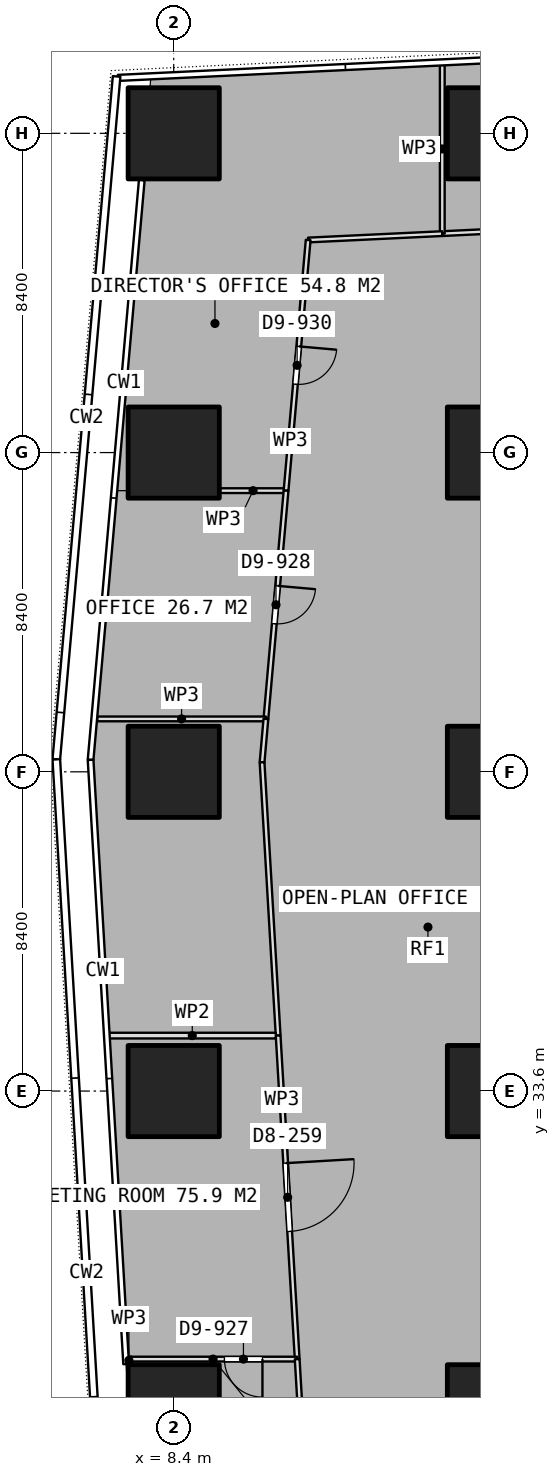
"""IFC4 building model, lengths in metres.
Left out: names, types, materials, properties, quantities, classifications, styles, units other than length and angle.
Written with IfcOpenShell. Run it as: python <this file> out.ifc"""

import sys

from ifc_helpers import new_model, si_unit, direction, frame, frame_2d, origin, origin_2d, place, context, subcontext, project, spatial, rectangle, extrude, element, fill, save


model = new_model("IFC4")
c1 = context("Model", 3, precision=1e-05, world=origin(), true_north=direction((0.0, 1.0)))
c2 = subcontext(c1, "Body", "Model", "MODEL_VIEW")
j1 = project(units=[si_unit("LENGTHUNIT", "METRE"), si_unit("PLANEANGLEUNIT", "RADIAN")], contexts=[c1])
p1 = place(None, origin())
s1 = spatial("IfcSite", under=j1, at=p1, CompositionType="ELEMENT")
p2 = place(p1, origin())
s2 = spatial("IfcBuilding", under=s1, at=p2, CompositionType="ELEMENT")
p3 = place(p2, frame((0.0, 0.0, 236.45)))
s3 = spatial("IfcBuildingStorey", under=s2, at=p3, CompositionType="ELEMENT", Elevation=236.45)
for number, where, z_axis, x_axis in (
    (1, (8.4, 25.2, 0.0), (0.0, 0.0, 1.0), (1.0, 0.0, 0.0)),
    (2, (8.4, 33.6, 0.0), (0.0, 0.0, 1.0), (1.0, 0.0, 0.0)),
    (3, (8.4, 42.0, 0.0), (0.0, 0.0, 1.0), (1.0, 0.0, 0.0)),
    (4, (8.4, 50.4, 0.0), (0.0, 0.0, 1.0), (1.0, 0.0, 0.0)),
    (5, (8.4, 58.8, 0.0), (0.0, 0.0, 1.0), (1.0, 0.0, 0.0)),
    (6, (16.8, 25.2, 0.0), (0.0, 0.0, 1.0), (1.0, 0.0, 0.0)),
    (7, (16.8, 33.6, 0.0), (0.0, 0.0, 1.0), (1.0, 0.0, 0.0)),
    (8, (16.8, 42.0, 0.0), (0.0, 0.0, 1.0), (1.0, 0.0, 0.0)),
    (9, (16.8, 50.4, 0.0), (0.0, 0.0, 1.0), (1.0, 0.0, 0.0)),
    (10, (16.8, 58.8, 0.0), (0.0, 0.0, 1.0), (1.0, 0.0, 0.0)),
):
    element("IfcColumn", number, at=place(p3, frame(where, z_axis=z_axis, x_axis=x_axis)), inside=s3, PredefinedType="COLUMN", context=c2, shape_type="SweptSolid", body=[
        extrude(rectangle(XDim=2.4, YDim=2.4, at=origin_2d()), origin(), (0.0, 0.0, 1.0), 3.75),
    ])
p4 = place(p3, frame((23.792, 56.559, 0.0), z_axis=(0.0, 0.0, 1.0), x_axis=(-0.998858041753, -0.047776693337, 0.0)))
e11 = element("IfcWall", 11, at=p4, inside=s3, PredefinedType="PARTITIONING", context=c2, shape_type="SweptSolid", body=[
    extrude(rectangle(XDim=8.334, YDim=0.125, at=frame_2d((4.167, 0.0))), origin(), (0.0, 0.0, 1.0), 3.4),
])
p5 = place(p3, frame((15.467, 56.161, 0.0), z_axis=(0.0, 0.0, 1.0), x_axis=(0.0, 1.0, 0.0)))
e12 = element("IfcWall", 12, at=p5, inside=s3, PredefinedType="PARTITIONING", context=c2, shape_type="SweptSolid", body=[
    extrude(rectangle(XDim=4.456, YDim=0.125, at=frame_2d((2.228, 0.0))), origin(), (0.0, 0.0, 1.0), 3.4),
])
p6 = place(p3, frame((11.356, 49.398, 0.0), z_axis=(0.0, 0.0, 1.0), x_axis=(-1.0, 0.0, 0.0)))
e13 = element("IfcWall", 13, at=p6, inside=s3, PredefinedType="PARTITIONING", context=c2, shape_type="SweptSolid", body=[
    extrude(rectangle(XDim=1.736, YDim=0.125, at=frame_2d((0.868, 0.0))), origin(), (0.0, 0.0, 1.0), 3.4),
])
p7 = place(p3, frame((15.466, 56.161, 0.0), z_axis=(0.0, 0.0, 1.0), x_axis=(-0.998868606823, -0.047555297315, 0.0)))
e14 = element("IfcWall", 14, at=p7, inside=s3, PredefinedType="PARTITIONING", context=c2, shape_type="SweptSolid", body=[
    extrude(rectangle(XDim=3.532, YDim=0.125, at=frame_2d((1.766, 0.0))), origin(), (0.0, 0.0, 1.0), 3.4),
])
p8 = place(p3, frame((11.938, 55.993, 0.0), z_axis=(0.0, 0.0, 1.0), x_axis=(-0.087912105784, -0.996128235548, 0.0)))
e15 = element("IfcWall", 15, at=p8, inside=s3, PredefinedType="PARTITIONING", context=c2, shape_type="SweptSolid", body=[
    extrude(rectangle(XDim=6.621, YDim=0.125, at=frame_2d((3.31, 0.0))), origin(), (0.0, 0.0, 1.0), 3.4),
])
p9 = place(p8, frame((2.81, 0.0, 0.0)))
e16 = element("IfcOpeningElement", 16, at=p9, cuts=e15, PredefinedType="OPENING", context=c2, shape_type="SweptSolid", body=[
    extrude(rectangle(XDim=1.0, YDim=2.1, at=frame_2d((0.5, 1.05))), frame((0.0, 0.073, 0.0), z_axis=(0.0, -1.0, 0.0), x_axis=(1.0, 0.0, 0.0)), (0.0, 0.0, 1.0), 0.145),
])
p10 = place(p3, frame((11.356, 49.397, 0.0), z_axis=(0.0, 0.0, 1.0), x_axis=(-0.08792454125, -0.996127137993, 0.0)))
e17 = element("IfcWall", 17, at=p10, inside=s3, PredefinedType="PARTITIONING", context=c2, shape_type="SweptSolid", body=[
    extrude(rectangle(XDim=6.028, YDim=0.125, at=frame_2d((3.014, 0.0))), origin(), (0.0, 0.0, 1.0), 3.4),
])
p11 = place(p10, frame((2.514, 0.0, 0.0)))
e18 = element("IfcOpeningElement", 18, at=p11, cuts=e17, PredefinedType="OPENING", context=c2, shape_type="SweptSolid", body=[
    extrude(rectangle(XDim=1.0, YDim=2.1, at=frame_2d((0.5, 1.05))), frame((0.0, 0.073, 0.0), z_axis=(0.0, -1.0, 0.0), x_axis=(1.0, 0.0, 0.0)), (0.0, 0.0, 1.0), 0.145),
])
p12 = place(p3, frame((10.826, 43.392, 0.0), z_axis=(0.0, 0.0, 1.0), x_axis=(-1.0, 0.0, 0.0)))
e19 = element("IfcWall", 19, at=p12, inside=s3, PredefinedType="PARTITIONING", context=c2, shape_type="SweptSolid", body=[
    extrude(rectangle(XDim=4.438, YDim=0.125, at=frame_2d((2.219, 0.0))), origin(), (0.0, 0.0, 1.0), 3.4),
])
p13 = place(p3, frame((10.826, 43.391, 0.0), z_axis=(0.0, 0.0, 1.0), x_axis=(-0.087943526258, -0.996125462073, 0.0)))
e20 = element("IfcWall", 20, at=p13, inside=s3, PredefinedType="PARTITIONING", context=c2, shape_type="SweptSolid", body=[
    extrude(rectangle(XDim=1.146, YDim=0.125, at=frame_2d((0.573, 0.0))), origin(), (0.0, 0.0, 1.0), 3.4),
])
p14 = place(p3, frame((10.725, 42.249, 0.0), z_axis=(0.0, 0.0, 1.0), x_axis=(0.058725997192, -0.998274139329, 0.0)))
e21 = element("IfcWall", 21, at=p14, inside=s3, PredefinedType="PARTITIONING", context=c2, shape_type="SweptSolid", body=[
    extrude(rectangle(XDim=7.2, YDim=0.125, at=frame_2d((3.6, 0.0))), origin(), (0.0, 0.0, 1.0), 3.4),
])
p15 = place(p3, frame((11.148, 35.061, 0.0), z_axis=(0.0, 0.0, 1.0), x_axis=(0.058740480754, -0.998273287192, 0.0)))
e22 = element("IfcWall", 22, at=p15, inside=s3, PredefinedType="PARTITIONING", context=c2, shape_type="SweptSolid", body=[
    extrude(rectangle(XDim=8.529, YDim=0.125, at=frame_2d((4.264, 0.0))), origin(), (0.0, 0.0, 1.0), 3.4),
])
p16 = place(p15, frame((3.364, 0.0, 0.0)))
e23 = element("IfcOpeningElement", 23, at=p16, cuts=e22, PredefinedType="OPENING", context=c2, shape_type="SweptSolid", body=[
    extrude(rectangle(XDim=1.8, YDim=2.1, at=frame_2d((0.9, 1.05))), frame((0.0, 0.073, 0.0), z_axis=(0.0, -1.0, 0.0), x_axis=(1.0, 0.0, 0.0)), (0.0, 0.0, 1.0), 0.145),
])
p17 = place(p3, frame((11.649, 26.547, 0.0), z_axis=(0.0, 0.0, 1.0), x_axis=(-1.0, 0.0, 0.0)))
e24 = element("IfcWall", 24, at=p17, inside=s3, PredefinedType="PARTITIONING", context=c2, shape_type="SweptSolid", body=[
    extrude(rectangle(XDim=4.428, YDim=0.125, at=frame_2d((2.214, 0.0))), origin(), (0.0, 0.0, 1.0), 3.4),
])
p18 = place(p17, frame((0.914, 0.0, 0.0)))
e25 = element("IfcOpeningElement", 25, at=p18, cuts=e24, PredefinedType="OPENING", context=c2, shape_type="SweptSolid", body=[
    extrude(rectangle(XDim=1.0, YDim=2.1, at=frame_2d((0.5, 1.05))), frame((0.0, 0.073, 0.0), z_axis=(0.0, -1.0, 0.0), x_axis=(1.0, 0.0, 0.0)), (0.0, 0.0, 1.0), 0.145),
])
p19 = place(p3, frame((11.649, 26.546, 0.0), z_axis=(0.0, 0.0, 1.0), x_axis=(0.058711043696, -0.998275018894, 0.0)))
e26 = element("IfcWall", 26, at=p19, inside=s3, PredefinedType="PARTITIONING", context=c2, shape_type="SweptSolid", body=[
    extrude(rectangle(XDim=2.607, YDim=0.125, at=frame_2d((1.304, 0.0))), origin(), (0.0, 0.0, 1.0), 3.4),
])
p20 = place(p3, frame((11.086, 35.059, 0.0), z_axis=(0.0, 0.0, 1.0), x_axis=(-1.0, 0.0, 0.0)))
e27 = element("IfcWall", 27, at=p20, inside=s3, PredefinedType="PARTITIONING", context=c2, shape_type="SweptSolid", body=[
    extrude(rectangle(XDim=4.396, YDim=0.15, at=frame_2d((2.198, 0.0))), origin(), (0.0, 0.0, 1.0), 3.4),
])
p21 = place(p3, frame((7.221, 26.61, 0.0), z_axis=(0.0, 0.0, 1.0), x_axis=(0.0, -1.0, 0.0)))
e28 = element("IfcWall", 28, at=p21, inside=s3, PredefinedType="PARTITIONING", context=c2, shape_type="SweptSolid", body=[
    extrude(rectangle(XDim=0.19, YDim=0.125, at=frame_2d((0.095, 0.0))), origin(), (0.0, 0.0, 1.0), 3.4),
])
p22 = place(p9, origin())
e29 = element("IfcDoor", 29, at=p22, inside=s3, OperationType="SINGLE_SWING_LEFT", PredefinedType="DOOR", context=c2, shape_type="SweptSolid", body=[
    extrude(rectangle(XDim=1.0, YDim=2.1, at=frame_2d((0.5, 1.05))), frame((0.0, 0.025, 0.0), z_axis=(0.0, -1.0, 0.0), x_axis=(1.0, 0.0, 0.0)), (0.0, 0.0, 1.0), 0.05),
])
fill(e16, e29)
p23 = place(p11, origin())
e30 = element("IfcDoor", 30, at=p23, inside=s3, OperationType="SINGLE_SWING_LEFT", PredefinedType="DOOR", context=c2, shape_type="SweptSolid", body=[
    extrude(rectangle(XDim=1.0, YDim=2.1, at=frame_2d((0.5, 1.05))), frame((0.0, 0.025, 0.0), z_axis=(0.0, -1.0, 0.0), x_axis=(1.0, 0.0, 0.0)), (0.0, 0.0, 1.0), 0.05),
])
fill(e18, e30)
p24 = place(p16, origin())
e31 = element("IfcDoor", 31, at=p24, inside=s3, OperationType="DOUBLE_DOOR_SINGLE_SWING", PredefinedType="DOOR", context=c2, shape_type="SweptSolid", body=[
    extrude(rectangle(XDim=1.8, YDim=2.1, at=frame_2d((0.9, 1.05))), frame((0.0, 0.025, 0.0), z_axis=(0.0, -1.0, 0.0), x_axis=(1.0, 0.0, 0.0)), (0.0, 0.0, 1.0), 0.05),
])
fill(e23, e31)
p25 = place(p18, origin())
e32 = element("IfcDoor", 32, at=p25, inside=s3, OperationType="SINGLE_SWING_LEFT", PredefinedType="DOOR", context=c2, shape_type="SweptSolid", body=[
    extrude(rectangle(XDim=1.0, YDim=2.1, at=frame_2d((0.5, 1.05))), frame((0.0, 0.025, 0.0), z_axis=(0.0, -1.0, 0.0), x_axis=(1.0, 0.0, 0.0)), (0.0, 0.0, 1.0), 0.05),
])
fill(e25, e32)
save(model, sys.argv[1])
